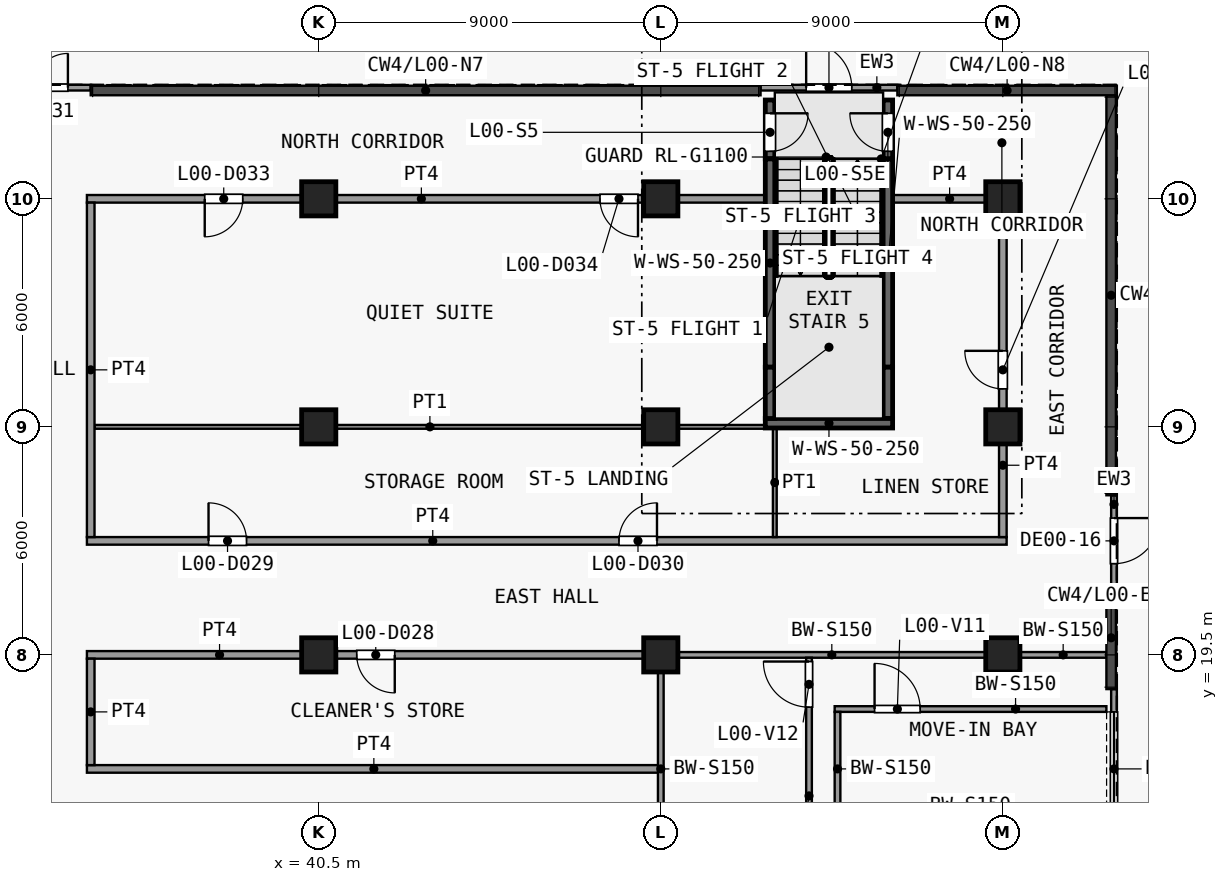
"""IFC4 building model, lengths in metres.
Left out: names, types, materials, properties, quantities, classifications, styles, units other than length and angle.
Written with IfcOpenShell. Run it as: python <this file> out.ifc"""

import sys

from ifc_helpers import new_model, si_unit, direction, frame, frame_2d, origin, origin_2d, place, context, subcontext, project, spatial, rectangle, extrude, element, fill, save


model = new_model("IFC4")
c1 = context("Model", 3, precision=1e-05, world=origin(), true_north=direction((0.0, 1.0)))
c2 = subcontext(c1, "Body", "Model", "MODEL_VIEW")
j1 = project(units=[si_unit("LENGTHUNIT", "METRE"), si_unit("PLANEANGLEUNIT", "RADIAN")], contexts=[c1])
p1 = place(None, origin())
s1 = spatial("IfcSite", under=j1, at=p1, CompositionType="ELEMENT")
p2 = place(p1, origin())
s2 = spatial("IfcBuilding", under=s1, at=p2, CompositionType="ELEMENT")
p3 = place(p2, origin())
s3 = spatial("IfcBuildingStorey", under=s2, at=p3, CompositionType="ELEMENT", Elevation=0.0)
for number, where, z_axis, x_axis in (
    (1, (40.5, 19.5, 0.0), (0.0, 0.0, 1.0), (1.0, 0.0, 0.0)),
    (2, (40.5, 25.5, 0.0), (0.0, 0.0, 1.0), (1.0, 0.0, 0.0)),
    (3, (40.5, 31.5, 0.0), (0.0, 0.0, 1.0), (1.0, 0.0, 0.0)),
    (4, (49.5, 19.5, 0.0), (0.0, 0.0, 1.0), (1.0, 0.0, 0.0)),
    (5, (49.5, 25.5, 0.0), (0.0, 0.0, 1.0), (1.0, 0.0, 0.0)),
    (6, (49.5, 31.5, 0.0), (0.0, 0.0, 1.0), (1.0, 0.0, 0.0)),
    (7, (58.5, 19.5, 0.0), (0.0, 0.0, 1.0), (1.0, 0.0, 0.0)),
    (8, (58.5, 25.5, 0.0), (0.0, 0.0, 1.0), (1.0, 0.0, 0.0)),
    (9, (58.5, 31.5, 0.0), (0.0, 0.0, 1.0), (1.0, 0.0, 0.0)),
):
    element("IfcColumn", number, at=place(p3, frame(where, z_axis=z_axis, x_axis=x_axis)), inside=s3, PredefinedType="COLUMN", context=c2, shape_type="SweptSolid", body=[
        extrude(rectangle(XDim=0.9, YDim=0.9, at=origin_2d()), origin(), (0.0, 0.0, 1.0), 8.0),
    ])
p4 = place(p3, frame((54.075, 18.075, 0.0), z_axis=(0.0, 0.0, 1.0), x_axis=(1.0, 0.0, 0.0)))
e10 = element("IfcWall", 10, at=p4, inside=s3, PredefinedType="PARTITIONING", context=c2, shape_type="SweptSolid", body=[
    extrude(rectangle(XDim=7.15, YDim=0.15, at=frame_2d((3.575, 0.0))), origin(), (0.0, 0.0, 1.0), 7.65),
])
p5 = place(p4, frame((1.05, 0.0, 0.0)))
e11 = element("IfcOpeningElement", 11, at=p5, cuts=e10, PredefinedType="OPENING", context=c2, shape_type="SweptSolid", body=[
    extrude(rectangle(XDim=1.2, YDim=2.1, at=frame_2d((0.6, 1.05))), frame((0.0, 0.085, 0.0), z_axis=(0.0, -1.0, 0.0), x_axis=(1.0, 0.0, 0.0)), (0.0, 0.0, 1.0), 0.17),
])
p6 = place(p3, frame((49.95, 19.5, 0.0), z_axis=(0.0, 0.0, 1.0), x_axis=(1.0, 0.0, 0.0)))
e12 = element("IfcWall", 12, at=p6, inside=s3, PredefinedType="PARTITIONING", context=c2, shape_type="SweptSolid", body=[
    extrude(rectangle(XDim=8.1, YDim=0.15, at=frame_2d((4.05, 0.0))), origin(), (0.0, 0.0, 1.0), 7.65),
])
p7 = place(p3, frame((58.95, 19.5, 0.0), z_axis=(0.0, 0.0, 1.0), x_axis=(1.0, 0.0, 0.0)))
e13 = element("IfcWall", 13, at=p7, inside=s3, PredefinedType="PARTITIONING", context=c2, shape_type="SweptSolid", body=[
    extrude(rectangle(XDim=2.275, YDim=0.15, at=frame_2d((1.138, 0.0))), origin(), (0.0, 0.0, 1.0), 7.65),
])
p8 = place(p3, frame((49.5, 13.95, 0.0), z_axis=(0.0, 0.0, 1.0), x_axis=(0.0, 1.0, 0.0)))
e14 = element("IfcWall", 14, at=p8, inside=s3, PredefinedType="PARTITIONING", context=c2, shape_type="SweptSolid", body=[
    extrude(rectangle(XDim=5.1, YDim=0.15, at=frame_2d((2.55, 0.0))), origin(), (0.0, 0.0, 1.0), 7.65),
])
p9 = place(p3, frame((53.4, 13.575, 0.0), z_axis=(0.0, 0.0, 1.0), x_axis=(0.0, 1.0, 0.0)))
e15 = element("IfcWall", 15, at=p9, inside=s3, PredefinedType="PARTITIONING", context=c2, shape_type="SweptSolid", body=[
    extrude(rectangle(XDim=5.85, YDim=0.15, at=frame_2d((2.925, 0.0))), origin(), (0.0, 0.0, 1.0), 7.65),
])
p10 = place(p9, frame((4.55, 0.0, 0.0)))
e16 = element("IfcOpeningElement", 16, at=p10, cuts=e15, PredefinedType="OPENING", context=c2, shape_type="SweptSolid", body=[
    extrude(rectangle(XDim=1.2, YDim=2.1, at=frame_2d((0.6, 1.05))), frame((0.0, 0.085, 0.0), z_axis=(0.0, -1.0, 0.0), x_axis=(1.0, 0.0, 0.0)), (0.0, 0.0, 1.0), 0.17),
])
p11 = place(p3, frame((54.15, 15.0, 0.0), z_axis=(0.0, 0.0, 1.0), x_axis=(0.0, 1.0, 0.0)))
e17 = element("IfcWall", 17, at=p11, inside=s3, PredefinedType="PARTITIONING", context=c2, shape_type="SweptSolid", body=[
    extrude(rectangle(XDim=3.0, YDim=0.15, at=frame_2d((1.5, 0.0))), origin(), (0.0, 0.0, 1.0), 7.65),
])
p12 = place(p3, frame((52.125, 34.425, 0.0), z_axis=(0.0, 0.0, 1.0), x_axis=(1.0, 0.0, 0.0)))
e18 = element("IfcWall", 18, at=p12, inside=s3, PredefinedType="SOLIDWALL", context=c2, shape_type="SweptSolid", body=[
    extrude(rectangle(XDim=3.6, YDim=0.15, at=frame_2d((1.8, 0.0))), origin(), (0.0, 0.0, 1.0), 7.65),
])
p13 = place(p12, frame((1.2, 0.0, 0.0)))
e19 = element("IfcOpeningElement", 19, at=p13, cuts=e18, PredefinedType="OPENING", context=c2, shape_type="SweptSolid", body=[
    extrude(rectangle(XDim=1.2, YDim=2.4, at=frame_2d((0.6, 1.2))), frame((0.0, 0.085, 0.0), z_axis=(0.0, -1.0, 0.0), x_axis=(1.0, 0.0, 0.0)), (0.0, 0.0, 1.0), 0.17),
])
p14 = place(p3, frame((61.425, 23.7, 0.0), z_axis=(0.0, 0.0, 1.0), x_axis=(0.0, -1.0, 0.0)))
e20 = element("IfcWall", 20, at=p14, inside=s3, PredefinedType="SOLIDWALL", context=c2, shape_type="SweptSolid", body=[
    extrude(rectangle(XDim=2.4, YDim=0.15, at=frame_2d((1.2, 0.0))), origin(), (0.0, 0.0, 1.0), 7.65),
])
p15 = place(p14, frame((0.6, 0.0, 0.0)))
e21 = element("IfcOpeningElement", 21, at=p15, cuts=e20, PredefinedType="OPENING", context=c2, shape_type="SweptSolid", body=[
    extrude(rectangle(XDim=1.2, YDim=2.4, at=frame_2d((0.6, 1.2))), frame((0.0, 0.085, 0.0), z_axis=(0.0, -1.0, 0.0), x_axis=(1.0, 0.0, 0.0)), (0.0, 0.0, 1.0), 0.17),
])
p16 = place(p3, frame((61.425, 18.6, 0.0), z_axis=(0.0, 0.0, 1.0), x_axis=(0.0, -1.0, 0.0)))
e22 = element("IfcWall", 22, at=p16, inside=s3, PredefinedType="SOLIDWALL", context=c2, shape_type="SweptSolid", body=[
    extrude(rectangle(XDim=4.2, YDim=0.15, at=frame_2d((2.1, 0.0))), origin(), (0.0, 0.0, 1.0), 7.65),
])
p17 = place(p16, frame((0.6, 0.0, 0.0)))
e23 = element("IfcOpeningElement", 23, at=p17, cuts=e22, PredefinedType="OPENING", context=c2, shape_type="SweptSolid", body=[
    extrude(rectangle(XDim=3.0, YDim=4.3, at=frame_2d((1.5, 2.15))), frame((0.0, 0.085, 0.0), z_axis=(0.0, -1.0, 0.0), x_axis=(1.0, 0.0, 0.0)), (0.0, 0.0, 1.0), 0.17),
])
p18 = place(p3, frame((30.95, 34.425, 0.0), z_axis=(0.0, 0.0, 1.0), x_axis=(1.0, 0.0, 0.0)))
e24 = element("IfcWall", 24, at=p18, inside=s3, PredefinedType="SOLIDWALL", context=c2, shape_type="SweptSolid", body=[
    extrude(rectangle(XDim=3.55, YDim=0.15, at=frame_2d((1.775, 0.0))), origin(), (0.0, 0.0, 1.0), 7.65),
])
p19 = place(p18, frame((1.15, 0.0, 0.0)))
e25 = element("IfcOpeningElement", 25, at=p19, cuts=e24, PredefinedType="OPENING", context=c2, shape_type="SweptSolid", body=[
    extrude(rectangle(XDim=1.8, YDim=2.4, at=frame_2d((0.9, 1.2))), frame((0.0, 0.085, 0.0), z_axis=(0.0, -1.0, 0.0), x_axis=(1.0, 0.0, 0.0)), (0.0, 0.0, 1.0), 0.17),
])
p20 = place(p3, frame((52.375, 34.1, 0.0), z_axis=(0.0, 0.0, 1.0), x_axis=(0.0, -1.0, 0.0)))
e26 = element("IfcWall", 26, at=p20, inside=s3, PredefinedType="SHEAR", context=c2, shape_type="SweptSolid", body=[
    extrude(rectangle(XDim=1.55, YDim=0.25, at=frame_2d((0.775, 0.0))), origin(), (0.0, 0.0, 1.0), 7.65),
])
p21 = place(p20, frame((0.35, 0.0, 0.0)))
e27 = element("IfcOpeningElement", 27, at=p21, cuts=e26, PredefinedType="OPENING", context=c2, shape_type="SweptSolid", body=[
    extrude(rectangle(XDim=1.0, YDim=2.1, at=frame_2d((0.5, 1.05))), frame((0.0, 0.135, 0.0), z_axis=(0.0, -1.0, 0.0), x_axis=(1.0, 0.0, 0.0)), (0.0, 0.0, 1.0), 0.27),
])
p22 = place(p3, frame((52.375, 27.07, 0.0), z_axis=(0.0, 0.0, 1.0), x_axis=(0.0, 1.0, 0.0)))
e28 = element("IfcWall", 28, at=p22, inside=s3, PredefinedType="SHEAR", context=c2, shape_type="SweptSolid", body=[
    extrude(rectangle(XDim=5.48, YDim=0.25, at=frame_2d((2.74, 0.0))), origin(), (0.0, 0.0, 1.0), 7.65),
])
p23 = place(p3, frame((52.375, 25.72, 0.0), z_axis=(0.0, 0.0, 1.0), x_axis=(0.0, 1.0, 0.0)))
e29 = element("IfcWall", 29, at=p23, inside=s3, PredefinedType="SHEAR", context=c2, shape_type="SweptSolid", body=[
    extrude(rectangle(XDim=1.35, YDim=0.25, at=frame_2d((0.675, 0.0))), origin(), (0.0, 0.0, 1.0), 7.65),
])
p24 = place(p3, frame((55.475, 32.55, 0.0), z_axis=(0.0, 0.0, 1.0), x_axis=(0.0, 1.0, 0.0)))
e30 = element("IfcWall", 30, at=p24, inside=s3, PredefinedType="SHEAR", context=c2, shape_type="SweptSolid", body=[
    extrude(rectangle(XDim=1.55, YDim=0.25, at=frame_2d((0.775, 0.0))), origin(), (0.0, 0.0, 1.0), 7.65),
])
p25 = place(p24, frame((0.2, 0.0, 0.0)))
e31 = element("IfcOpeningElement", 31, at=p25, cuts=e30, PredefinedType="OPENING", context=c2, shape_type="SweptSolid", body=[
    extrude(rectangle(XDim=1.0, YDim=2.1, at=frame_2d((0.5, 1.05))), frame((0.0, 0.135, 0.0), z_axis=(0.0, -1.0, 0.0), x_axis=(1.0, 0.0, 0.0)), (0.0, 0.0, 1.0), 0.27),
])
p26 = place(p3, frame((55.475, 27.07, 0.0), z_axis=(0.0, 0.0, 1.0), x_axis=(0.0, 1.0, 0.0)))
e32 = element("IfcWall", 32, at=p26, inside=s3, PredefinedType="SHEAR", context=c2, shape_type="SweptSolid", body=[
    extrude(rectangle(XDim=5.48, YDim=0.25, at=frame_2d((2.74, 0.0))), origin(), (0.0, 0.0, 1.0), 7.65),
])
p27 = place(p3, frame((55.475, 25.72, 0.0), z_axis=(0.0, 0.0, 1.0), x_axis=(0.0, 1.0, 0.0)))
e33 = element("IfcWall", 33, at=p27, inside=s3, PredefinedType="SHEAR", context=c2, shape_type="SweptSolid", body=[
    extrude(rectangle(XDim=1.35, YDim=0.25, at=frame_2d((0.675, 0.0))), origin(), (0.0, 0.0, 1.0), 7.65),
])
p28 = place(p3, frame((52.25, 25.595, 0.0), z_axis=(0.0, 0.0, 1.0), x_axis=(1.0, 0.0, 0.0)))
e34 = element("IfcWall", 34, at=p28, inside=s3, PredefinedType="SHEAR", context=c2, shape_type="SweptSolid", body=[
    extrude(rectangle(XDim=3.35, YDim=0.25, at=frame_2d((1.675, 0.0))), origin(), (0.0, 0.0, 1.0), 7.65),
])
p29 = place(p3, frame((34.4, 16.5, 0.0), z_axis=(0.0, 0.0, 1.0), x_axis=(1.0, 0.0, 0.0)))
e35 = element("IfcWall", 35, at=p29, inside=s3, PredefinedType="PARTITIONING", context=c2, shape_type="SweptSolid", body=[
    extrude(rectangle(XDim=15.1, YDim=0.2, at=frame_2d((7.55, 0.0))), origin(), (0.0, 0.0, 1.0), 7.65),
])
p30 = place(p3, frame((34.4, 19.5, 0.0), z_axis=(0.0, 0.0, 1.0), x_axis=(1.0, 0.0, 0.0)))
e36 = element("IfcWall", 36, at=p30, inside=s3, PredefinedType="PARTITIONING", context=c2, shape_type="SweptSolid", body=[
    extrude(rectangle(XDim=15.1, YDim=0.2, at=frame_2d((7.55, 0.0))), origin(), (0.0, 0.0, 1.0), 7.65),
])
p31 = place(p30, frame((7.1, 0.0, 0.0)))
e37 = element("IfcOpeningElement", 37, at=p31, cuts=e36, PredefinedType="OPENING", context=c2, shape_type="SweptSolid", body=[
    extrude(rectangle(XDim=1.0, YDim=2.1, at=frame_2d((0.5, 1.05))), frame((0.0, 0.11, 0.0), z_axis=(0.0, -1.0, 0.0), x_axis=(1.0, 0.0, 0.0)), (0.0, 0.0, 1.0), 0.22),
])
p32 = place(p3, frame((34.4, 22.5, 0.0), z_axis=(0.0, 0.0, 1.0), x_axis=(1.0, 0.0, 0.0)))
e38 = element("IfcWall", 38, at=p32, inside=s3, PredefinedType="PARTITIONING", context=c2, shape_type="SweptSolid", body=[
    extrude(rectangle(XDim=24.2, YDim=0.2, at=frame_2d((12.1, 0.0))), origin(), (0.0, 0.0, 1.0), 7.65),
])
p33 = place(p32, frame((3.2, 0.0, 0.0)))
e39 = element("IfcOpeningElement", 39, at=p33, cuts=e38, PredefinedType="OPENING", context=c2, shape_type="SweptSolid", body=[
    extrude(rectangle(XDim=1.0, YDim=2.1, at=frame_2d((0.5, 1.05))), frame((0.0, 0.11, 0.0), z_axis=(0.0, -1.0, 0.0), x_axis=(1.0, 0.0, 0.0)), (0.0, 0.0, 1.0), 0.22),
])
p34 = place(p32, frame((14.0, 0.0, 0.0)))
e40 = element("IfcOpeningElement", 40, at=p34, cuts=e38, PredefinedType="OPENING", context=c2, shape_type="SweptSolid", body=[
    extrude(rectangle(XDim=1.0, YDim=2.1, at=frame_2d((0.5, 1.05))), frame((0.0, 0.11, 0.0), z_axis=(0.0, -1.0, 0.0), x_axis=(1.0, 0.0, 0.0)), (0.0, 0.0, 1.0), 0.22),
])
p35 = place(p3, frame((34.6, 25.5, 0.0), z_axis=(0.0, 0.0, 1.0), x_axis=(1.0, 0.0, 0.0)))
e41 = element("IfcWall", 41, at=p35, inside=s3, PredefinedType="PARTITIONING", context=c2, shape_type="SweptSolid", body=[
    extrude(rectangle(XDim=17.65, YDim=0.1, at=frame_2d((8.825, 0.0))), origin(), (0.0, 0.0, 1.0), 7.65),
])
p36 = place(p3, frame((34.4, 31.5, 0.0), z_axis=(0.0, 0.0, 1.0), x_axis=(1.0, 0.0, 0.0)))
e42 = element("IfcWall", 42, at=p36, inside=s3, PredefinedType="PARTITIONING", context=c2, shape_type="SweptSolid", body=[
    extrude(rectangle(XDim=17.85, YDim=0.2, at=frame_2d((8.925, 0.0))), origin(), (0.0, 0.0, 1.0), 7.65),
])
p37 = place(p36, frame((3.1, 0.0, 0.0)))
e43 = element("IfcOpeningElement", 43, at=p37, cuts=e42, PredefinedType="OPENING", context=c2, shape_type="SweptSolid", body=[
    extrude(rectangle(XDim=1.0, YDim=2.1, at=frame_2d((0.5, 1.05))), frame((0.0, 0.11, 0.0), z_axis=(0.0, -1.0, 0.0), x_axis=(1.0, 0.0, 0.0)), (0.0, 0.0, 1.0), 0.22),
])
p38 = place(p36, frame((13.5, 0.0, 0.0)))
e44 = element("IfcOpeningElement", 44, at=p38, cuts=e42, PredefinedType="OPENING", context=c2, shape_type="SweptSolid", body=[
    extrude(rectangle(XDim=1.0, YDim=2.1, at=frame_2d((0.5, 1.05))), frame((0.0, 0.11, 0.0), z_axis=(0.0, -1.0, 0.0), x_axis=(1.0, 0.0, 0.0)), (0.0, 0.0, 1.0), 0.22),
])
p39 = place(p3, frame((55.6, 31.5, 0.0), z_axis=(0.0, 0.0, 1.0), x_axis=(1.0, 0.0, 0.0)))
e45 = element("IfcWall", 45, at=p39, inside=s3, PredefinedType="PARTITIONING", context=c2, shape_type="SweptSolid", body=[
    extrude(rectangle(XDim=3.0, YDim=0.2, at=frame_2d((1.5, 0.0))), origin(), (0.0, 0.0, 1.0), 7.65),
])
p40 = place(p3, frame((34.5, 16.6, 0.0), z_axis=(0.0, 0.0, 1.0), x_axis=(0.0, 1.0, 0.0)))
e46 = element("IfcWall", 46, at=p40, inside=s3, PredefinedType="PARTITIONING", context=c2, shape_type="SweptSolid", body=[
    extrude(rectangle(XDim=2.8, YDim=0.2, at=frame_2d((1.4, 0.0))), origin(), (0.0, 0.0, 1.0), 7.65),
])
p41 = place(p3, frame((34.5, 22.6, 0.0), z_axis=(0.0, 0.0, 1.0), x_axis=(0.0, 1.0, 0.0)))
e47 = element("IfcWall", 47, at=p41, inside=s3, PredefinedType="PARTITIONING", context=c2, shape_type="SweptSolid", body=[
    extrude(rectangle(XDim=8.8, YDim=0.2, at=frame_2d((4.4, 0.0))), origin(), (0.0, 0.0, 1.0), 7.65),
])
p42 = place(p3, frame((52.5, 22.6, 0.0), z_axis=(0.0, 0.0, 1.0), x_axis=(0.0, 1.0, 0.0)))
e48 = element("IfcWall", 48, at=p42, inside=s3, PredefinedType="PARTITIONING", context=c2, shape_type="SweptSolid", body=[
    extrude(rectangle(XDim=2.87, YDim=0.1, at=frame_2d((1.435, 0.0))), origin(), (0.0, 0.0, 1.0), 7.65),
])
p43 = place(p3, frame((58.5, 22.6, 0.0), z_axis=(0.0, 0.0, 1.0), x_axis=(0.0, 1.0, 0.0)))
e49 = element("IfcWall", 49, at=p43, inside=s3, PredefinedType="PARTITIONING", context=c2, shape_type="SweptSolid", body=[
    extrude(rectangle(XDim=8.8, YDim=0.2, at=frame_2d((4.4, 0.0))), origin(), (0.0, 0.0, 1.0), 7.65),
])
p44 = place(p43, frame((3.9, 0.0, 0.0)))
e50 = element("IfcOpeningElement", 50, at=p44, cuts=e49, PredefinedType="OPENING", context=c2, shape_type="SweptSolid", body=[
    extrude(rectangle(XDim=1.0, YDim=2.1, at=frame_2d((0.5, 1.05))), frame((0.0, 0.11, 0.0), z_axis=(0.0, -1.0, 0.0), x_axis=(1.0, 0.0, 0.0)), (0.0, 0.0, 1.0), 0.22),
])
p45 = place(p5, origin())
e51 = element("IfcDoor", 51, at=p45, inside=s3, OperationType="SINGLE_SWING_LEFT", PredefinedType="DOOR", context=c2, shape_type="SweptSolid", body=[
    extrude(rectangle(XDim=1.2, YDim=2.1, at=frame_2d((0.6, 1.05))), frame((0.0, 0.025, 0.0), z_axis=(0.0, -1.0, 0.0), x_axis=(1.0, 0.0, 0.0)), (0.0, 0.0, 1.0), 0.05),
])
fill(e11, e51)
p46 = place(p10, origin())
e52 = element("IfcDoor", 52, at=p46, inside=s3, OperationType="SINGLE_SWING_RIGHT", PredefinedType="DOOR", context=c2, shape_type="SweptSolid", body=[
    extrude(rectangle(XDim=1.2, YDim=2.1, at=frame_2d((0.6, 1.05))), frame((0.0, 0.025, 0.0), z_axis=(0.0, -1.0, 0.0), x_axis=(1.0, 0.0, 0.0)), (0.0, 0.0, 1.0), 0.05),
])
fill(e16, e52)
p47 = place(p13, origin())
e53 = element("IfcDoor", 53, at=p47, inside=s3, OperationType="SINGLE_SWING_LEFT", PredefinedType="DOOR", context=c2, shape_type="SweptSolid", body=[
    extrude(rectangle(XDim=1.2, YDim=2.4, at=frame_2d((0.6, 1.2))), frame((0.0, 0.025, 0.0), z_axis=(0.0, -1.0, 0.0), x_axis=(1.0, 0.0, 0.0)), (0.0, 0.0, 1.0), 0.05),
])
fill(e19, e53)
p48 = place(p15, origin())
e54 = element("IfcDoor", 54, at=p48, inside=s3, OperationType="SINGLE_SWING_LEFT", PredefinedType="DOOR", context=c2, shape_type="SweptSolid", body=[
    extrude(rectangle(XDim=1.2, YDim=2.4, at=frame_2d((0.6, 1.2))), frame((0.0, 0.025, 0.0), z_axis=(0.0, -1.0, 0.0), x_axis=(1.0, 0.0, 0.0)), (0.0, 0.0, 1.0), 0.05),
])
fill(e21, e54)
p49 = place(p17, origin())
e55 = element("IfcDoor", 55, at=p49, inside=s3, OperationType="ROLLINGUP", PredefinedType="DOOR", context=c2, shape_type="SweptSolid", body=[
    extrude(rectangle(XDim=3.0, YDim=4.3, at=frame_2d((1.5, 2.15))), frame((0.0, 0.025, 0.0), z_axis=(0.0, -1.0, 0.0), x_axis=(1.0, 0.0, 0.0)), (0.0, 0.0, 1.0), 0.05),
])
fill(e23, e55)
p50 = place(p19, origin())
e56 = element("IfcDoor", 56, at=p50, inside=s3, OperationType="DOUBLE_DOOR_SINGLE_SWING", PredefinedType="DOOR", context=c2, shape_type="SweptSolid", body=[
    extrude(rectangle(XDim=1.8, YDim=2.4, at=frame_2d((0.9, 1.2))), frame((0.0, 0.025, 0.0), z_axis=(0.0, -1.0, 0.0), x_axis=(1.0, 0.0, 0.0)), (0.0, 0.0, 1.0), 0.05),
])
fill(e25, e56)
p51 = place(p21, origin())
e57 = element("IfcDoor", 57, at=p51, inside=s3, OperationType="SINGLE_SWING_LEFT", PredefinedType="DOOR", context=c2, shape_type="SweptSolid", body=[
    extrude(rectangle(XDim=1.0, YDim=2.1, at=frame_2d((0.5, 1.05))), frame((0.0, 0.025, 0.0), z_axis=(0.0, -1.0, 0.0), x_axis=(1.0, 0.0, 0.0)), (0.0, 0.0, 1.0), 0.05),
])
fill(e27, e57)
p52 = place(p25, origin())
e58 = element("IfcDoor", 58, at=p52, inside=s3, OperationType="SINGLE_SWING_RIGHT", PredefinedType="DOOR", context=c2, shape_type="SweptSolid", body=[
    extrude(rectangle(XDim=1.0, YDim=2.1, at=frame_2d((0.5, 1.05))), frame((0.0, 0.025, 0.0), z_axis=(0.0, -1.0, 0.0), x_axis=(1.0, 0.0, 0.0)), (0.0, 0.0, 1.0), 0.05),
])
fill(e31, e58)
p53 = place(p31, origin())
e59 = element("IfcDoor", 59, at=p53, inside=s3, OperationType="SINGLE_SWING_RIGHT", PredefinedType="DOOR", context=c2, shape_type="SweptSolid", body=[
    extrude(rectangle(XDim=1.0, YDim=2.1, at=frame_2d((0.5, 1.05))), frame((0.0, 0.025, 0.0), z_axis=(0.0, -1.0, 0.0), x_axis=(1.0, 0.0, 0.0)), (0.0, 0.0, 1.0), 0.05),
])
fill(e37, e59)
p54 = place(p33, origin())
e60 = element("IfcDoor", 60, at=p54, inside=s3, OperationType="SINGLE_SWING_RIGHT", PredefinedType="DOOR", context=c2, shape_type="SweptSolid", body=[
    extrude(rectangle(XDim=1.0, YDim=2.1, at=frame_2d((0.5, 1.05))), frame((0.0, 0.025, 0.0), z_axis=(0.0, -1.0, 0.0), x_axis=(1.0, 0.0, 0.0)), (0.0, 0.0, 1.0), 0.05),
])
fill(e39, e60)
p55 = place(p34, origin())
e61 = element("IfcDoor", 61, at=p55, inside=s3, OperationType="SINGLE_SWING_LEFT", PredefinedType="DOOR", context=c2, shape_type="SweptSolid", body=[
    extrude(rectangle(XDim=1.0, YDim=2.1, at=frame_2d((0.5, 1.05))), frame((0.0, 0.025, 0.0), z_axis=(0.0, -1.0, 0.0), x_axis=(1.0, 0.0, 0.0)), (0.0, 0.0, 1.0), 0.05),
])
fill(e40, e61)
p56 = place(p37, origin())
e62 = element("IfcDoor", 62, at=p56, inside=s3, OperationType="SINGLE_SWING_LEFT", PredefinedType="DOOR", context=c2, shape_type="SweptSolid", body=[
    extrude(rectangle(XDim=1.0, YDim=2.1, at=frame_2d((0.5, 1.05))), frame((0.0, 0.025, 0.0), z_axis=(0.0, -1.0, 0.0), x_axis=(1.0, 0.0, 0.0)), (0.0, 0.0, 1.0), 0.05),
])
fill(e43, e62)
p57 = place(p38, origin())
e63 = element("IfcDoor", 63, at=p57, inside=s3, OperationType="SINGLE_SWING_RIGHT", PredefinedType="DOOR", context=c2, shape_type="SweptSolid", body=[
    extrude(rectangle(XDim=1.0, YDim=2.1, at=frame_2d((0.5, 1.05))), frame((0.0, 0.025, 0.0), z_axis=(0.0, -1.0, 0.0), x_axis=(1.0, 0.0, 0.0)), (0.0, 0.0, 1.0), 0.05),
])
fill(e44, e63)
p58 = place(p44, origin())
e64 = element("IfcDoor", 64, at=p58, inside=s3, OperationType="SINGLE_SWING_LEFT", PredefinedType="DOOR", context=c2, shape_type="SweptSolid", body=[
    extrude(rectangle(XDim=1.0, YDim=2.1, at=frame_2d((0.5, 1.05))), frame((0.0, 0.025, 0.0), z_axis=(0.0, -1.0, 0.0), x_axis=(1.0, 0.0, 0.0)), (0.0, 0.0, 1.0), 0.05),
])
fill(e50, e64)
save(model, sys.argv[1])
